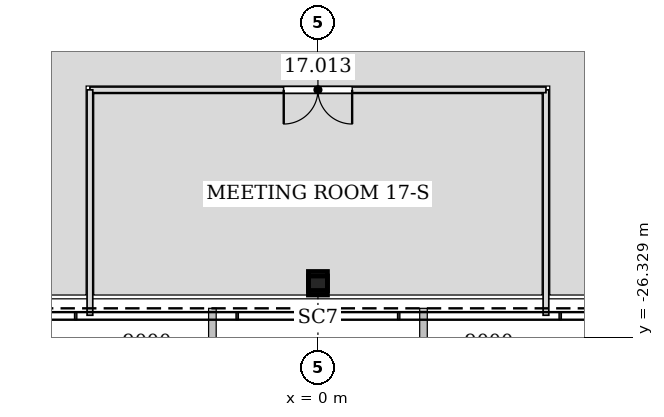
"""IFC4 building model, lengths in metres.
Left out: names, types, materials, properties, quantities, classifications, styles, units other than length and angle.
Written with IfcOpenShell. Run it as: python <this file> out.ifc"""

import sys

from ifc_helpers import new_model, si_unit, direction, frame, frame_2d, origin, origin_2d, place, context, subcontext, project, spatial, rectangle, hollow_rectangle, extrude, element, fill, save


model = new_model("IFC4")
c1 = context("Model", 3, precision=1e-05, world=origin(), true_north=direction((0.0, 1.0)))
c2 = subcontext(c1, "Body", "Model", "MODEL_VIEW")
j1 = project(units=[si_unit("LENGTHUNIT", "METRE"), si_unit("PLANEANGLEUNIT", "RADIAN")], contexts=[c1])
p1 = place(None, origin())
s1 = spatial("IfcSite", under=j1, at=p1, CompositionType="ELEMENT")
p2 = place(p1, origin())
s2 = spatial("IfcBuilding", under=s1, at=p2, CompositionType="ELEMENT")
p3 = place(p2, frame((0.0, 0.0, 79.2)))
s3 = spatial("IfcBuildingStorey", under=s2, at=p3, CompositionType="ELEMENT", Elevation=79.2)
p4 = place(p3, frame((0.0, -24.974, 0.0), z_axis=(0.0, 0.028297679255, 0.99959954049), x_axis=(-1.0, 0.0, 0.0)))
e1 = element("IfcColumn", 1, at=p4, inside=s3, PredefinedType="COLUMN", context=c2, shape_type="SweptSolid", body=[
    extrude(hollow_rectangle(XDim=0.5, YDim=0.5, WallThickness=0.025, at=origin_2d()), origin(), (0.0, 0.0, 1.0), 4.202),
])
p5 = place(p3, frame((6.0, -25.756, 0.0), z_axis=(0.0, 0.0, 1.0), x_axis=(0.0, 1.0, 0.0)))
e2 = element("IfcWall", 2, at=p5, inside=s3, PredefinedType="PARTITIONING", context=c2, shape_type="SweptSolid", body=[
    extrude(rectangle(XDim=5.932, YDim=0.15, at=frame_2d((2.966, 0.0))), origin(), (0.0, 0.0, 1.0), 3.423),
])
p6 = place(p3, frame((6.0, -19.824, 0.0), z_axis=(0.0, 0.0, 1.0), x_axis=(-1.0, 0.0, 0.0)))
e3 = element("IfcWall", 3, at=p6, inside=s3, PredefinedType="PARTITIONING", context=c2, shape_type="SweptSolid", body=[
    extrude(rectangle(XDim=12.0, YDim=0.15, at=frame_2d((6.0, 0.0))), origin(), (0.0, 0.0, 1.0), 3.065),
])
p7 = place(p6, frame((5.1, 0.0, 0.0)))
e4 = element("IfcOpeningElement", 4, at=p7, cuts=e3, PredefinedType="OPENING", context=c2, shape_type="SweptSolid", body=[
    extrude(rectangle(XDim=1.8, YDim=2.4, at=frame_2d((0.9, 1.2))), frame((0.0, 0.085, 0.0), z_axis=(0.0, -1.0, 0.0), x_axis=(1.0, 0.0, 0.0)), (0.0, 0.0, 1.0), 0.17),
])
p8 = place(p3, frame((-6.0, -19.824, 0.0), z_axis=(0.0, 0.0, 1.0), x_axis=(0.0, -1.0, 0.0)))
e5 = element("IfcWall", 5, at=p8, inside=s3, PredefinedType="PARTITIONING", context=c2, shape_type="SweptSolid", body=[
    extrude(rectangle(XDim=5.932, YDim=0.15, at=frame_2d((2.966, 0.0))), origin(), (0.0, 0.0, 1.0), 3.423),
])
p9 = place(p7, origin())
e6 = element("IfcDoor", 6, at=p9, inside=s3, OperationType="DOUBLE_DOOR_SINGLE_SWING", PredefinedType="DOOR", context=c2, shape_type="SweptSolid", body=[
    extrude(rectangle(XDim=1.8, YDim=2.4, at=frame_2d((0.9, 1.2))), frame((0.0, 0.025, 0.0), z_axis=(0.0, -1.0, 0.0), x_axis=(1.0, 0.0, 0.0)), (0.0, 0.0, 1.0), 0.05),
])
fill(e4, e6)
save(model, sys.argv[1])
